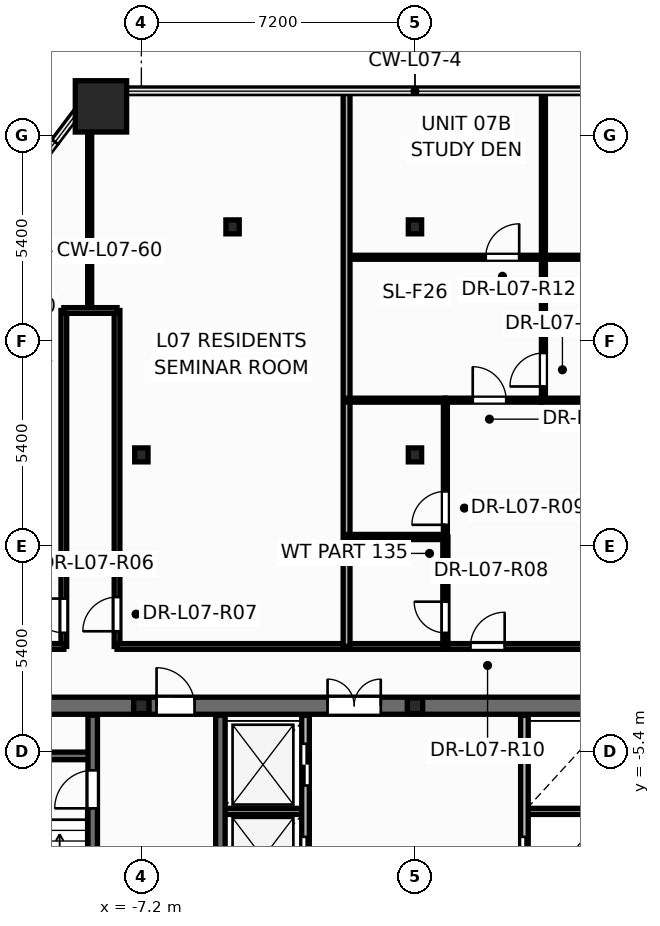
"""IFC4 building model, lengths in metres.
Left out: names, types, materials, properties, quantities, classifications, styles, units other than length and angle.
Written with IfcOpenShell. Run it as: python <this file> out.ifc"""

import sys

from ifc_helpers import new_model, si_unit, direction, frame, frame_2d, origin, origin_2d, place, context, subcontext, project, spatial, rectangle, hollow_rectangle, i_section, extrude, element, fill, save


model = new_model("IFC4")
c1 = context("Model", 3, precision=1e-05, world=origin(), true_north=direction((0.0, 1.0)))
c2 = subcontext(c1, "Body", "Model", "MODEL_VIEW")
j1 = project(units=[si_unit("LENGTHUNIT", "METRE"), si_unit("PLANEANGLEUNIT", "RADIAN")], contexts=[c1])
p1 = place(None, origin())
s1 = spatial("IfcSite", under=j1, at=p1, CompositionType="ELEMENT")
p2 = place(p1, origin())
s2 = spatial("IfcBuilding", under=s1, at=p2, CompositionType="ELEMENT")
p3 = place(p2, frame((0.0, 0.0, 31.5)))
s3 = spatial("IfcBuildingStorey", under=s2, at=p3, CompositionType="ELEMENT", Elevation=31.5)
p4 = place(p3, frame((-8.263, 11.57, 0.0), z_axis=(0.0, 0.0, 1.0), x_axis=(1.0, 0.0, 0.0)))
e1 = element("IfcColumn", 1, at=p4, inside=s3, PredefinedType="COLUMN", context=c2, shape_type="SweptSolid", body=[
    extrude(hollow_rectangle(XDim=1.35, YDim=1.35, WallThickness=0.065, at=origin_2d()), origin(), (0.0, 0.0, 1.0), 3.6),
])
for number, where, z_axis, x_axis in (
    (2, (-7.2, -4.2, 0.0), (0.0, 0.0, 1.0), (1.0, 0.0, 0.0)),
    (3, (0.0, -4.2, 0.0), (0.0, 0.0, 1.0), (1.0, 0.0, 0.0)),
):
    element("IfcColumn", number, at=place(p3, frame(where, z_axis=z_axis, x_axis=x_axis)), inside=s3, PredefinedType="PILASTER", context=c2, shape_type="SweptSolid", body=[
        extrude(i_section(OverallWidth=0.405, OverallDepth=0.414, WebThickness=0.022, FlangeThickness=0.032, at=origin_2d()), origin(), (0.0, 0.0, 1.0), 3.6),
    ])
for number, where, z_axis, x_axis in (
    (4, (-7.2, 2.4, 0.0), (0.0, 0.0, 1.0), (1.0, 0.0, 0.0)),
    (5, (0.0, 2.4, 0.0), (0.0, 0.0, 1.0), (1.0, 0.0, 0.0)),
    (6, (-4.8, 8.4, 0.0), (0.0, 0.0, 1.0), (1.0, 0.0, 0.0)),
    (7, (0.0, 8.4, 0.0), (0.0, 0.0, 1.0), (1.0, 0.0, 0.0)),
):
    element("IfcColumn", number, at=place(p3, frame(where, z_axis=z_axis, x_axis=x_axis)), inside=s3, PredefinedType="COLUMN", context=c2, shape_type="SweptSolid", body=[
        extrude(i_section(OverallWidth=0.35, OverallDepth=0.367, WebThickness=0.025, FlangeThickness=0.032, at=origin_2d()), origin(), (0.0, 0.0, 1.0), 3.6),
    ])
for number, where, z_axis, x_axis in (
    (8, (-5.12, -6.98, 0.0), (0.0, 0.0, 1.0), (1.0, 0.0, 0.0)),
    (9, (2.88, -6.98, 0.0), (0.0, 0.0, 1.0), (1.0, 0.0, 0.0)),
):
    element("IfcWall", number, at=place(p3, frame(where, z_axis=z_axis, x_axis=x_axis)), inside=s3, PredefinedType="PARTITIONING", context=c2, shape_type="SweptSolid", body=[
        extrude(rectangle(XDim=2.24, YDim=0.16, at=frame_2d((1.12, 0.0))), origin(), (0.0, 0.0, 1.0), 3.35),
    ])
p5 = place(p3, frame((-12.65, -4.2, 0.0), z_axis=(0.0, 0.0, 1.0), x_axis=(1.0, 0.0, 0.0)))
e10 = element("IfcWall", 10, at=p5, inside=s3, PredefinedType="SHEAR", context=c2, shape_type="SweptSolid", body=[
    extrude(rectangle(XDim=25.3, YDim=0.45, at=frame_2d((12.65, 0.0))), origin(), (0.0, 0.0, 1.0), 3.6),
])
p6 = place(p5, frame((1.85, 0.0, 0.0)))
e11 = element("IfcOpeningElement", 11, at=p6, cuts=e10, PredefinedType="OPENING", context=c2, shape_type="SweptSolid", body=[
    extrude(rectangle(XDim=0.756, YDim=2.054, at=frame_2d((0.375, 1.027))), frame((0.0, 0.235, 0.0), z_axis=(0.0, -1.0, 0.0), x_axis=(1.0, 0.0, 0.0)), (0.0, 0.0, 1.0), 0.47),
])
p7 = place(p5, frame((21.85, 0.0, 0.0)))
e12 = element("IfcOpeningElement", 12, at=p7, cuts=e10, PredefinedType="OPENING", context=c2, shape_type="SweptSolid", body=[
    extrude(rectangle(XDim=0.756, YDim=2.054, at=frame_2d((0.375, 1.027))), frame((0.0, 0.235, 0.0), z_axis=(0.0, -1.0, 0.0), x_axis=(1.0, 0.0, 0.0)), (0.0, 0.0, 1.0), 0.47),
])
p8 = place(p5, frame((23.5, 0.0, 0.0)))
e13 = element("IfcOpeningElement", 13, at=p8, cuts=e10, PredefinedType="OPENING", context=c2, shape_type="SweptSolid", body=[
    extrude(rectangle(XDim=0.756, YDim=2.054, at=frame_2d((0.375, 1.027))), frame((0.0, 0.235, 0.0), z_axis=(0.0, -1.0, 0.0), x_axis=(1.0, 0.0, 0.0)), (0.0, 0.0, 1.0), 0.47),
])
p9 = place(p5, frame((5.85, 0.0, 0.0)))
e14 = element("IfcOpeningElement", 14, at=p9, cuts=e10, PredefinedType="OPENING", context=c2, shape_type="SweptSolid", body=[
    extrude(rectangle(XDim=1.006, YDim=2.104, at=frame_2d((0.5, 1.052))), frame((0.0, 0.235, 0.0), z_axis=(0.0, -1.0, 0.0), x_axis=(1.0, 0.0, 0.0)), (0.0, 0.0, 1.0), 0.47),
])
p10 = place(p5, frame((10.35, 0.0, 0.0)))
e15 = element("IfcOpeningElement", 15, at=p10, cuts=e10, PredefinedType="OPENING", context=c2, shape_type="SweptSolid", body=[
    extrude(rectangle(XDim=1.406, YDim=2.154, at=frame_2d((0.7, 1.077))), frame((0.0, 0.235, 0.0), z_axis=(0.0, -1.0, 0.0), x_axis=(1.0, 0.0, 0.0)), (0.0, 0.0, 1.0), 0.47),
])
p11 = place(p5, frame((18.45, 0.0, 0.0)))
e16 = element("IfcOpeningElement", 16, at=p11, cuts=e10, PredefinedType="OPENING", context=c2, shape_type="SweptSolid", body=[
    extrude(rectangle(XDim=1.006, YDim=2.104, at=frame_2d((0.5, 1.052))), frame((0.0, 0.235, 0.0), z_axis=(0.0, -1.0, 0.0), x_axis=(1.0, 0.0, 0.0)), (0.0, 0.0, 1.0), 0.47),
])
p12 = place(p3, frame((-12.35, -5.52, 0.0), z_axis=(0.0, 0.0, 1.0), x_axis=(1.0, 0.0, 0.0)))
e17 = element("IfcWall", 17, at=p12, inside=s3, PredefinedType="SOLIDWALL", context=c2, shape_type="SweptSolid", body=[
    extrude(rectangle(XDim=3.87, YDim=0.2, at=frame_2d((1.935, 0.0))), origin(), (0.0, 0.0, 1.0), 3.6),
])
p13 = place(p3, frame((-8.48, -13.85, 0.0), z_axis=(0.0, 0.0, 1.0), x_axis=(0.0, 1.0, 0.0)))
e18 = element("IfcWall", 18, at=p13, inside=s3, PredefinedType="SHEAR", context=c2, shape_type="SweptSolid", body=[
    extrude(rectangle(XDim=9.4, YDim=0.25, at=frame_2d((4.7, 0.0))), origin(), (0.0, 0.0, 1.0), 3.6),
])
p14 = place(p13, frame((6.95, 0.0, 0.0)))
e19 = element("IfcOpeningElement", 19, at=p14, cuts=e18, PredefinedType="OPENING", context=c2, shape_type="SweptSolid", body=[
    extrude(rectangle(XDim=1.006, YDim=2.104, at=frame_2d((0.5, 1.052))), frame((0.0, 0.135, 0.0), z_axis=(0.0, -1.0, 0.0), x_axis=(1.0, 0.0, 0.0)), (0.0, 0.0, 1.0), 0.27),
])
p15 = place(p3, frame((-5.12, -13.85, 0.0), z_axis=(0.0, 0.0, 1.0), x_axis=(0.0, 1.0, 0.0)))
e20 = element("IfcWall", 20, at=p15, inside=s3, PredefinedType="SHEAR", context=c2, shape_type="SweptSolid", body=[
    extrude(rectangle(XDim=9.4, YDim=0.25, at=frame_2d((4.7, 0.0))), origin(), (0.0, 0.0, 1.0), 3.6),
])
p16 = place(p3, frame((-2.88, -9.45, 0.0), z_axis=(0.0, 0.0, 1.0), x_axis=(0.0, 1.0, 0.0)))
e21 = element("IfcWall", 21, at=p16, inside=s3, PredefinedType="SOLIDWALL", context=c2, shape_type="SweptSolid", body=[
    extrude(rectangle(XDim=5.0, YDim=0.2, at=frame_2d((2.5, 0.0))), origin(), (0.0, 0.0, 1.0), 3.35),
])
p17 = place(p16, frame((0.7, 0.0, 0.0)))
e22 = element("IfcOpeningElement", 22, at=p17, cuts=e21, PredefinedType="OPENING", context=c2, shape_type="SweptSolid", body=[
    extrude(rectangle(XDim=1.106, YDim=2.104, at=frame_2d((0.55, 1.052))), frame((0.0, 0.11, 0.0), z_axis=(0.0, -1.0, 0.0), x_axis=(1.0, 0.0, 0.0)), (0.0, 0.0, 1.0), 0.22),
])
p18 = place(p16, frame((3.15, 0.0, 0.0)))
e23 = element("IfcOpeningElement", 23, at=p18, cuts=e21, PredefinedType="OPENING", context=c2, shape_type="SweptSolid", body=[
    extrude(rectangle(XDim=1.106, YDim=2.104, at=frame_2d((0.55, 1.052))), frame((0.0, 0.11, 0.0), z_axis=(0.0, -1.0, 0.0), x_axis=(1.0, 0.0, 0.0)), (0.0, 0.0, 1.0), 0.22),
])
p19 = place(p3, frame((2.88, -9.45, 0.0), z_axis=(0.0, 0.0, 1.0), x_axis=(0.0, 1.0, 0.0)))
e24 = element("IfcWall", 24, at=p19, inside=s3, PredefinedType="SOLIDWALL", context=c2, shape_type="SweptSolid", body=[
    extrude(rectangle(XDim=5.0, YDim=0.2, at=frame_2d((2.5, 0.0))), origin(), (0.0, 0.0, 1.0), 3.35),
])
p20 = place(p19, frame((0.7, 0.0, 0.0)))
e25 = element("IfcOpeningElement", 25, at=p20, cuts=e24, PredefinedType="OPENING", context=c2, shape_type="SweptSolid", body=[
    extrude(rectangle(XDim=1.106, YDim=2.104, at=frame_2d((0.55, 1.052))), frame((0.0, 0.11, 0.0), z_axis=(0.0, -1.0, 0.0), x_axis=(1.0, 0.0, 0.0)), (0.0, 0.0, 1.0), 0.22),
])
p21 = place(p3, frame((-9.24, -2.64, 0.0), z_axis=(0.0, 0.0, 1.0), x_axis=(0.0, 1.0, 0.0)))
e26 = element("IfcWall", 26, at=p21, inside=s3, PredefinedType="PARTITIONING", context=c2, shape_type="SweptSolid", body=[
    extrude(rectangle(XDim=8.84, YDim=0.15, at=frame_2d((4.42, 0.0))), origin(), (0.0, 0.0, 1.0), 2.509),
])
p22 = place(p21, frame((0.359, 0.0, 0.0)))
e27 = element("IfcOpeningElement", 27, at=p22, cuts=e26, PredefinedType="OPENING", context=c2, shape_type="SweptSolid", body=[
    extrude(rectangle(XDim=0.906, YDim=2.104, at=frame_2d((0.45, 1.052))), frame((0.0, 0.085, 0.0), z_axis=(0.0, -1.0, 0.0), x_axis=(1.0, 0.0, 0.0)), (0.0, 0.0, 1.0), 0.17),
])
p23 = place(p3, frame((-7.84, -2.64, 0.0), z_axis=(0.0, 0.0, 1.0), x_axis=(0.0, 1.0, 0.0)))
e28 = element("IfcWall", 28, at=p23, inside=s3, PredefinedType="PARTITIONING", context=c2, shape_type="SweptSolid", body=[
    extrude(rectangle(XDim=8.84, YDim=0.15, at=frame_2d((4.42, 0.0))), origin(), (0.0, 0.0, 1.0), 2.509),
])
p24 = place(p23, frame((0.399, 0.0, 0.0)))
e29 = element("IfcOpeningElement", 29, at=p24, cuts=e28, PredefinedType="OPENING", context=c2, shape_type="SweptSolid", body=[
    extrude(rectangle(XDim=0.906, YDim=2.104, at=frame_2d((0.45, 1.052))), frame((0.0, 0.085, 0.0), z_axis=(0.0, -1.0, 0.0), x_axis=(1.0, 0.0, 0.0)), (0.0, 0.0, 1.0), 0.17),
])
p25 = place(p3, frame((0.74, -2.64, 0.0), z_axis=(0.0, 0.0, 1.0), x_axis=(1.0, 0.0, 0.0)))
e30 = element("IfcWall", 30, at=p25, inside=s3, PredefinedType="PARTITIONING", context=c2, shape_type="SweptSolid", body=[
    extrude(rectangle(XDim=7.1, YDim=0.15, at=frame_2d((3.55, 0.0))), origin(), (0.0, 0.0, 1.0), 2.325),
])
p26 = place(p25, frame((0.72, 0.0, 0.0)))
e31 = element("IfcOpeningElement", 31, at=p26, cuts=e30, PredefinedType="OPENING", context=c2, shape_type="SweptSolid", body=[
    extrude(rectangle(XDim=0.906, YDim=2.104, at=frame_2d((0.45, 1.052))), frame((0.0, 0.085, 0.0), z_axis=(0.0, -1.0, 0.0), x_axis=(1.0, 0.0, 0.0)), (0.0, 0.0, 1.0), 0.17),
])
p27 = place(p3, frame((-7.84, -2.64, 0.0), z_axis=(0.0, 0.0, 1.0), x_axis=(1.0, 0.0, 0.0)))
e32 = element("IfcWall", 32, at=p27, inside=s3, PredefinedType="PARTITIONING", context=c2, shape_type="SweptSolid", body=[
    extrude(rectangle(XDim=8.578, YDim=0.15, at=frame_2d((4.289, 0.0))), origin(), (0.0, 0.0, 1.0), 2.325),
])
p28 = place(p3, frame((-8.56, 6.2, 0.0), z_axis=(0.0, 0.0, 1.0), x_axis=(0.0, 1.0, 0.0)))
e33 = element("IfcWall", 33, at=p28, inside=s3, PredefinedType="PARTITIONING", context=c2, shape_type="SweptSolid", body=[
    extrude(rectangle(XDim=5.641, YDim=0.105, at=frame_2d((2.821, 0.0))), origin(), (0.0, 0.0, 1.0), 2.509),
])
p29 = place(p3, frame((3.38, 7.6, 0.0), z_axis=(0.0, 0.0, 1.0), x_axis=(1.0, 0.0, 0.0)))
e34 = element("IfcWall", 34, at=p29, inside=s3, PredefinedType="PARTITIONING", context=c2, shape_type="SweptSolid", body=[
    extrude(rectangle(XDim=5.18, YDim=0.105, at=frame_2d((2.59, 0.0))), origin(), (0.0, 0.0, 1.0), 2.509),
])
p30 = place(p29, frame((3.304, 0.0, 0.0)))
e35 = element("IfcOpeningElement", 35, at=p30, cuts=e34, PredefinedType="OPENING", context=c2, shape_type="SweptSolid", body=[
    extrude(rectangle(XDim=0.886, YDim=2.104, at=frame_2d((0.44, 1.052))), frame((0.0, 0.062, 0.0), z_axis=(0.0, -1.0, 0.0), x_axis=(1.0, 0.0, 0.0)), (0.0, 0.0, 1.0), 0.125),
])
p31 = place(p3, frame((-1.8, 7.6, 0.0), z_axis=(0.0, 0.0, 1.0), x_axis=(1.0, 0.0, 0.0)))
e36 = element("IfcWall", 36, at=p31, inside=s3, PredefinedType="PARTITIONING", context=c2, shape_type="SweptSolid", body=[
    extrude(rectangle(XDim=5.18, YDim=0.105, at=frame_2d((2.59, 0.0))), origin(), (0.0, 0.0, 1.0), 2.325),
])
p32 = place(p31, frame((3.663, 0.0, 0.0)))
e37 = element("IfcOpeningElement", 37, at=p32, cuts=e36, PredefinedType="OPENING", context=c2, shape_type="SweptSolid", body=[
    extrude(rectangle(XDim=0.886, YDim=2.104, at=frame_2d((0.44, 1.052))), frame((0.0, 0.062, 0.0), z_axis=(0.0, -1.0, 0.0), x_axis=(1.0, 0.0, 0.0)), (0.0, 0.0, 1.0), 0.125),
])
p33 = place(p3, frame((3.32, 3.84, 0.0), z_axis=(0.0, 0.0, 1.0), x_axis=(1.0, 0.0, 0.0)))
e38 = element("IfcWall", 38, at=p33, inside=s3, PredefinedType="PARTITIONING", context=c2, shape_type="SweptSolid", body=[
    extrude(rectangle(XDim=4.52, YDim=0.105, at=frame_2d((2.26, 0.0))), origin(), (0.0, 0.0, 1.0), 2.509),
])
p34 = place(p3, frame((-1.8, -2.64, 0.0), z_axis=(0.0, 0.0, 1.0), x_axis=(0.0, 1.0, 0.0)))
e39 = element("IfcWall", 39, at=p34, inside=s3, PredefinedType="PARTITIONING", context=c2, shape_type="SweptSolid", body=[
    extrude(rectangle(XDim=14.61, YDim=0.18, at=frame_2d((7.305, 0.0))), origin(), (0.0, 0.0, 1.0), 2.325),
])
p35 = place(p3, frame((3.38, 7.6, 0.0), z_axis=(0.0, 0.0, 1.0), x_axis=(0.0, 1.0, 0.0)))
e40 = element("IfcWall", 40, at=p35, inside=s3, PredefinedType="PARTITIONING", context=c2, shape_type="SweptSolid", body=[
    extrude(rectangle(XDim=4.37, YDim=0.105, at=frame_2d((2.185, 0.0))), origin(), (0.0, 0.0, 1.0), 2.509),
])
p36 = place(p3, frame((3.38, 3.84, 0.0), z_axis=(0.0, 0.0, 1.0), x_axis=(0.0, 1.0, 0.0)))
e41 = element("IfcWall", 41, at=p36, inside=s3, PredefinedType="PARTITIONING", context=c2, shape_type="SweptSolid", body=[
    extrude(rectangle(XDim=3.76, YDim=0.105, at=frame_2d((1.88, 0.0))), origin(), (0.0, 0.0, 1.0), 3.35),
])
p37 = place(p36, frame((0.36, 0.0, 0.0)))
e42 = element("IfcOpeningElement", 42, at=p37, cuts=e41, PredefinedType="OPENING", context=c2, shape_type="SweptSolid", body=[
    extrude(rectangle(XDim=0.886, YDim=2.104, at=frame_2d((0.44, 1.052))), frame((0.0, 0.062, 0.0), z_axis=(0.0, -1.0, 0.0), x_axis=(1.0, 0.0, 0.0)), (0.0, 0.0, 1.0), 0.125),
])
p38 = place(p3, frame((0.8, 0.24, 0.0), z_axis=(0.0, 0.0, 1.0), x_axis=(0.0, 1.0, 0.0)))
e43 = element("IfcWall", 43, at=p38, inside=s3, PredefinedType="PARTITIONING", context=c2, shape_type="SweptSolid", body=[
    extrude(rectangle(XDim=3.6, YDim=0.105, at=frame_2d((1.8, 0.0))), origin(), (0.0, 0.0, 1.0), 2.325),
])
p39 = place(p38, frame((0.32, 0.0, 0.0)))
e44 = element("IfcOpeningElement", 44, at=p39, cuts=e43, PredefinedType="OPENING", context=c2, shape_type="SweptSolid", body=[
    extrude(rectangle(XDim=0.886, YDim=2.104, at=frame_2d((0.44, 1.052))), frame((0.0, 0.062, 0.0), z_axis=(0.0, -1.0, 0.0), x_axis=(1.0, 0.0, 0.0)), (0.0, 0.0, 1.0), 0.125),
])
p40 = place(p3, frame((-12.5, -2.64, 0.0), z_axis=(0.0, 0.0, 1.0), x_axis=(1.0, 0.0, 0.0)))
e45 = element("IfcWall", 45, at=p40, inside=s3, PredefinedType="PARTITIONING", context=c2, shape_type="SweptSolid", body=[
    extrude(rectangle(XDim=3.26, YDim=0.15, at=frame_2d((1.63, 0.0))), origin(), (0.0, 0.0, 1.0), 3.35),
])
p41 = place(p3, frame((0.8, -2.64, 0.0), z_axis=(0.0, 0.0, 1.0), x_axis=(0.0, 1.0, 0.0)))
e46 = element("IfcWall", 46, at=p41, inside=s3, PredefinedType="PARTITIONING", context=c2, shape_type="SweptSolid", body=[
    extrude(rectangle(XDim=2.88, YDim=0.135, at=frame_2d((1.44, 0.0))), origin(), (0.0, 0.0, 1.0), 3.35),
])
p42 = place(p41, frame((0.357, 0.0, 0.0)))
e47 = element("IfcOpeningElement", 47, at=p42, cuts=e46, PredefinedType="OPENING", context=c2, shape_type="SweptSolid", body=[
    extrude(rectangle(XDim=0.826, YDim=2.104, at=frame_2d((0.41, 1.052))), frame((0.0, 0.078, 0.0), z_axis=(0.0, -1.0, 0.0), x_axis=(1.0, 0.0, 0.0)), (0.0, 0.0, 1.0), 0.155),
])
p43 = place(p3, frame((0.8, 3.84, 0.0), z_axis=(0.0, 0.0, 1.0), x_axis=(1.0, 0.0, 0.0)))
e48 = element("IfcWall", 48, at=p43, inside=s3, PredefinedType="PARTITIONING", context=c2, shape_type="SweptSolid", body=[
    extrude(rectangle(XDim=2.518, YDim=0.105, at=frame_2d((1.259, 0.0))), origin(), (0.0, 0.0, 1.0), 2.919),
])
p44 = place(p43, frame((0.72, 0.0, 0.0)))
e49 = element("IfcOpeningElement", 49, at=p44, cuts=e48, PredefinedType="OPENING", context=c2, shape_type="SweptSolid", body=[
    extrude(rectangle(XDim=0.886, YDim=2.104, at=frame_2d((0.44, 1.052))), frame((0.0, 0.062, 0.0), z_axis=(0.0, -1.0, 0.0), x_axis=(1.0, 0.0, 0.0)), (0.0, 0.0, 1.0), 0.125),
])
p45 = place(p3, frame((-1.8, 0.24, 0.0), z_axis=(0.0, 0.0, 1.0), x_axis=(1.0, 0.0, 0.0)))
e50 = element("IfcWall", 50, at=p45, inside=s3, PredefinedType="PARTITIONING", context=c2, shape_type="SweptSolid", body=[
    extrude(rectangle(XDim=2.6, YDim=0.135, at=frame_2d((1.3, 0.0))), origin(), (0.0, 0.0, 1.0), 2.325),
])
p46 = place(p3, frame((-1.8, 3.84, 0.0), z_axis=(0.0, 0.0, 1.0), x_axis=(1.0, 0.0, 0.0)))
e51 = element("IfcWall", 51, at=p46, inside=s3, PredefinedType="PARTITIONING", context=c2, shape_type="SweptSolid", body=[
    extrude(rectangle(XDim=2.6, YDim=0.105, at=frame_2d((1.3, 0.0))), origin(), (0.0, 0.0, 1.0), 2.325),
])
p47 = place(p3, frame((-9.24, 6.2, 0.0), z_axis=(0.0, 0.0, 1.0), x_axis=(1.0, 0.0, 0.0)))
e52 = element("IfcWall", 52, at=p47, inside=s3, PredefinedType="PARTITIONING", context=c2, shape_type="SweptSolid", body=[
    extrude(rectangle(XDim=1.4, YDim=0.15, at=frame_2d((0.7, 0.0))), origin(), (0.0, 0.0, 1.0), 3.35),
])
p48 = place(p17, origin())
e53 = element("IfcDoor", 53, at=p48, inside=s3, OperationType="DOUBLE_DOOR_SLIDING", PredefinedType="DOOR", context=c2, shape_type="SweptSolid", body=[
    extrude(rectangle(XDim=1.1, YDim=2.1, at=frame_2d((0.55, 1.05))), frame((0.0, 0.025, 0.0), z_axis=(0.0, -1.0, 0.0), x_axis=(1.0, 0.0, 0.0)), (0.0, 0.0, 1.0), 0.05),
])
fill(e22, e53)
p49 = place(p18, origin())
e54 = element("IfcDoor", 54, at=p49, inside=s3, OperationType="DOUBLE_DOOR_SLIDING", PredefinedType="DOOR", context=c2, shape_type="SweptSolid", body=[
    extrude(rectangle(XDim=1.1, YDim=2.1, at=frame_2d((0.55, 1.05))), frame((0.0, 0.025, 0.0), z_axis=(0.0, -1.0, 0.0), x_axis=(1.0, 0.0, 0.0)), (0.0, 0.0, 1.0), 0.05),
])
fill(e23, e54)
p50 = place(p20, origin())
e55 = element("IfcDoor", 55, at=p50, inside=s3, OperationType="DOUBLE_DOOR_SLIDING", PredefinedType="DOOR", context=c2, shape_type="SweptSolid", body=[
    extrude(rectangle(XDim=1.1, YDim=2.1, at=frame_2d((0.55, 1.05))), frame((0.0, 0.025, 0.0), z_axis=(0.0, -1.0, 0.0), x_axis=(1.0, 0.0, 0.0)), (0.0, 0.0, 1.0), 0.05),
])
fill(e25, e55)
p51 = place(p14, origin())
e56 = element("IfcDoor", 56, at=p51, inside=s3, OperationType="SINGLE_SWING_LEFT", PredefinedType="DOOR", context=c2, shape_type="SweptSolid", body=[
    extrude(rectangle(XDim=1.0, YDim=2.1, at=frame_2d((0.5, 1.05))), frame((0.0, 0.025, 0.0), z_axis=(0.0, -1.0, 0.0), x_axis=(1.0, 0.0, 0.0)), (0.0, 0.0, 1.0), 0.05),
])
fill(e19, e56)
p52 = place(p9, origin())
e57 = element("IfcDoor", 57, at=p52, inside=s3, OperationType="SINGLE_SWING_LEFT", PredefinedType="DOOR", context=c2, shape_type="SweptSolid", body=[
    extrude(rectangle(XDim=1.0, YDim=2.1, at=frame_2d((0.5, 1.05))), frame((0.0, 0.025, 0.0), z_axis=(0.0, -1.0, 0.0), x_axis=(1.0, 0.0, 0.0)), (0.0, 0.0, 1.0), 0.05),
])
fill(e14, e57)
p53 = place(p10, origin())
e58 = element("IfcDoor", 58, at=p53, inside=s3, OperationType="DOUBLE_DOOR_SINGLE_SWING", PredefinedType="DOOR", context=c2, shape_type="SweptSolid", body=[
    extrude(rectangle(XDim=1.4, YDim=2.15, at=frame_2d((0.7, 1.075))), frame((0.0, 0.025, 0.0), z_axis=(0.0, -1.0, 0.0), x_axis=(1.0, 0.0, 0.0)), (0.0, 0.0, 1.0), 0.05),
])
fill(e15, e58)
p54 = place(p22, origin())
e59 = element("IfcDoor", 59, at=p54, inside=s3, OperationType="SINGLE_SWING_RIGHT", PredefinedType="DOOR", context=c2, shape_type="SweptSolid", body=[
    extrude(rectangle(XDim=0.9, YDim=2.1, at=frame_2d((0.45, 1.05))), frame((0.0, 0.025, 0.0), z_axis=(0.0, -1.0, 0.0), x_axis=(1.0, 0.0, 0.0)), (0.0, 0.0, 1.0), 0.05),
])
fill(e27, e59)
p55 = place(p24, origin())
e60 = element("IfcDoor", 60, at=p55, inside=s3, OperationType="SINGLE_SWING_LEFT", PredefinedType="DOOR", context=c2, shape_type="SweptSolid", body=[
    extrude(rectangle(XDim=0.9, YDim=2.1, at=frame_2d((0.45, 1.05))), frame((0.0, 0.025, 0.0), z_axis=(0.0, -1.0, 0.0), x_axis=(1.0, 0.0, 0.0)), (0.0, 0.0, 1.0), 0.05),
])
fill(e29, e60)
p56 = place(p42, origin())
e61 = element("IfcDoor", 61, at=p56, inside=s3, OperationType="SINGLE_SWING_RIGHT", PredefinedType="DOOR", context=c2, shape_type="SweptSolid", body=[
    extrude(rectangle(XDim=0.82, YDim=2.1, at=frame_2d((0.41, 1.05))), frame((0.0, 0.025, 0.0), z_axis=(0.0, -1.0, 0.0), x_axis=(1.0, 0.0, 0.0)), (0.0, 0.0, 1.0), 0.05),
])
fill(e47, e61)
p57 = place(p39, origin())
e62 = element("IfcDoor", 62, at=p57, inside=s3, OperationType="SINGLE_SWING_LEFT", PredefinedType="DOOR", context=c2, shape_type="SweptSolid", body=[
    extrude(rectangle(XDim=0.88, YDim=2.1, at=frame_2d((0.44, 1.05))), frame((0.0, 0.025, 0.0), z_axis=(0.0, -1.0, 0.0), x_axis=(1.0, 0.0, 0.0)), (0.0, 0.0, 1.0), 0.05),
])
fill(e44, e62)
p58 = place(p26, origin())
e63 = element("IfcDoor", 63, at=p58, inside=s3, OperationType="SINGLE_SWING_RIGHT", PredefinedType="DOOR", context=c2, shape_type="SweptSolid", body=[
    extrude(rectangle(XDim=0.9, YDim=2.1, at=frame_2d((0.45, 1.05))), frame((0.0, 0.025, 0.0), z_axis=(0.0, -1.0, 0.0), x_axis=(1.0, 0.0, 0.0)), (0.0, 0.0, 1.0), 0.05),
])
fill(e31, e63)
p59 = place(p44, origin())
e64 = element("IfcDoor", 64, at=p59, inside=s3, OperationType="SINGLE_SWING_LEFT", PredefinedType="DOOR", context=c2, shape_type="SweptSolid", body=[
    extrude(rectangle(XDim=0.88, YDim=2.1, at=frame_2d((0.44, 1.05))), frame((0.0, 0.025, 0.0), z_axis=(0.0, -1.0, 0.0), x_axis=(1.0, 0.0, 0.0)), (0.0, 0.0, 1.0), 0.05),
])
fill(e49, e64)
p60 = place(p32, origin())
e65 = element("IfcDoor", 65, at=p60, inside=s3, OperationType="SINGLE_SWING_RIGHT", PredefinedType="DOOR", context=c2, shape_type="SweptSolid", body=[
    extrude(rectangle(XDim=0.88, YDim=2.1, at=frame_2d((0.44, 1.05))), frame((0.0, 0.025, 0.0), z_axis=(0.0, -1.0, 0.0), x_axis=(1.0, 0.0, 0.0)), (0.0, 0.0, 1.0), 0.05),
])
fill(e37, e65)
p61 = place(p37, origin())
e66 = element("IfcDoor", 66, at=p61, inside=s3, OperationType="SINGLE_SWING_LEFT", PredefinedType="DOOR", context=c2, shape_type="SweptSolid", body=[
    extrude(rectangle(XDim=0.88, YDim=2.1, at=frame_2d((0.44, 1.05))), frame((0.0, 0.025, 0.0), z_axis=(0.0, -1.0, 0.0), x_axis=(1.0, 0.0, 0.0)), (0.0, 0.0, 1.0), 0.05),
])
fill(e42, e66)
save(model, sys.argv[1])
